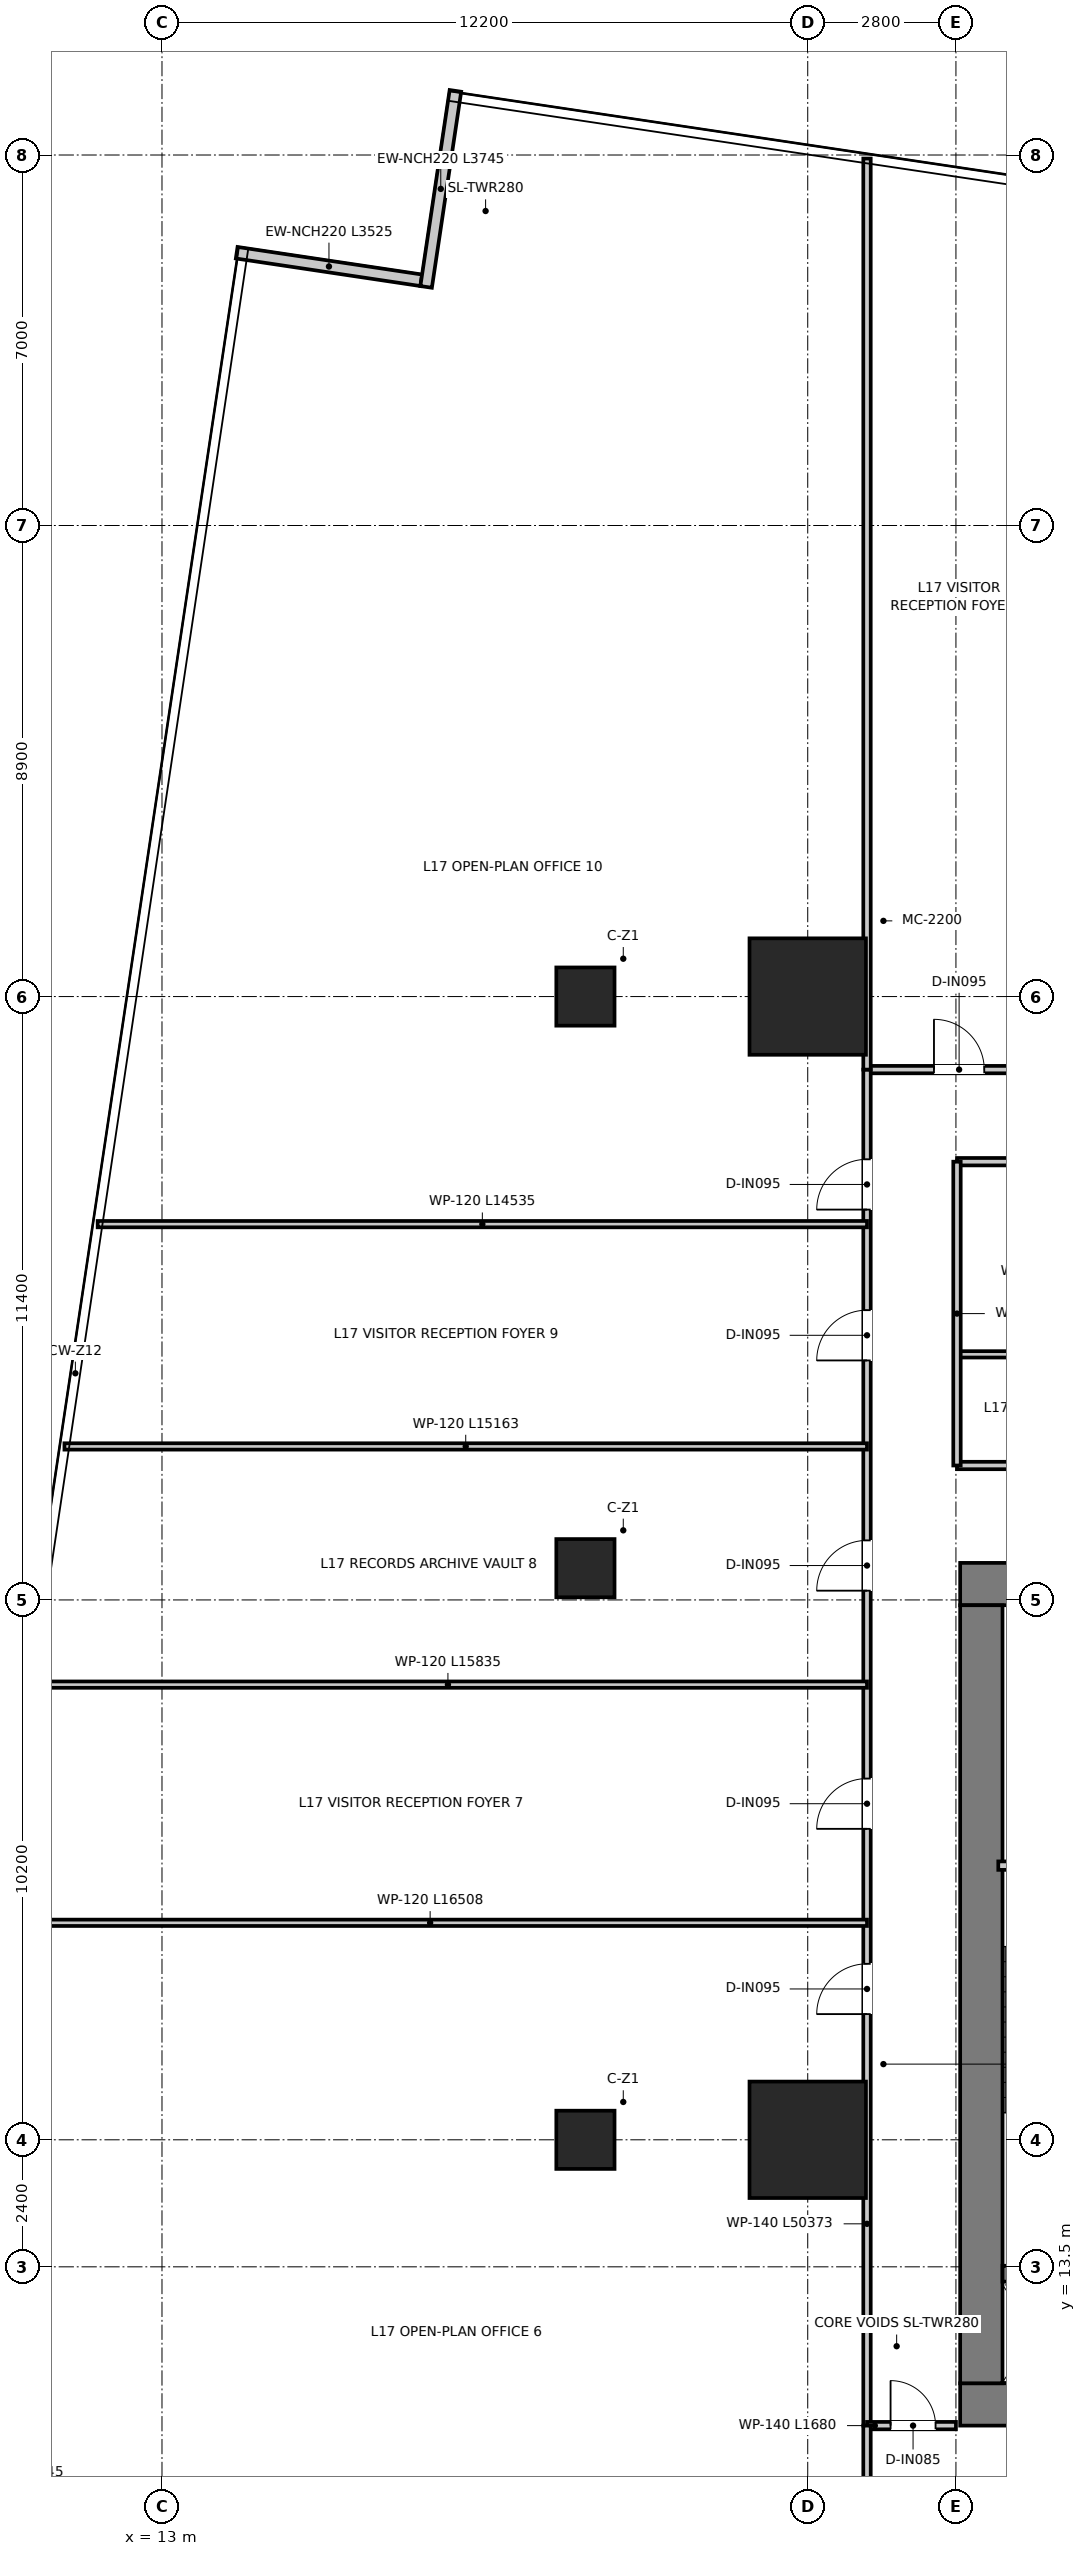
"""IFC4 building model, lengths in metres.
Left out: names, types, materials, properties, quantities, classifications, styles, units other than length and angle.
Written with IfcOpenShell. Run it as: python <this file> out.ifc"""

import sys

from ifc_helpers import new_model, si_unit, direction, frame, frame_2d, origin, origin_2d, place, context, subcontext, project, spatial, rectangle, extrude, source, transform, mapped, element, fill, save


model = new_model("IFC4")
c1 = context("Model", 3, precision=1e-05, world=origin(), true_north=direction((0.0, 1.0)))
c2 = subcontext(c1, "Body", "Model", "MODEL_VIEW")
j1 = project(units=[si_unit("LENGTHUNIT", "METRE"), si_unit("PLANEANGLEUNIT", "RADIAN")], contexts=[c1])
p1 = place(None, origin())
s1 = spatial("IfcSite", under=j1, at=p1, CompositionType="ELEMENT")
p2 = place(p1, origin())
s2 = spatial("IfcBuilding", under=s1, at=p2, CompositionType="ELEMENT")
p3 = place(p2, frame((0.0, 0.0, 72.4)))
s3 = spatial("IfcBuildingStorey", under=s2, at=p3, CompositionType="ELEMENT", Elevation=72.4)
p4 = place(p3, frame((28.08, 10.9, 0.0), z_axis=(0.0, 0.0, 1.0), x_axis=(1.0, 0.0, 0.0)))
e1 = element("IfcWall", 1, at=p4, inside=s3, PredefinedType="SHEAR", context=c2, shape_type="SweptSolid", body=[
    extrude(rectangle(XDim=15.84, YDim=0.8, at=frame_2d((7.92, 0.0))), origin(), (0.0, 0.0, 1.0), 3.95),
])
p5 = place(p3, frame((28.08, 26.4, 0.0), z_axis=(0.0, 0.0, 1.0), x_axis=(1.0, 0.0, 0.0)))
e2 = element("IfcWall", 2, at=p5, inside=s3, PredefinedType="SHEAR", context=c2, shape_type="SweptSolid", body=[
    extrude(rectangle(XDim=15.84, YDim=0.8, at=frame_2d((7.92, 0.0))), origin(), (0.0, 0.0, 1.0), 3.95),
])
p6 = place(p5, frame((7.22, 0.0, 0.0)))
e3 = element("IfcOpeningElement", 3, at=p6, cuts=e2, PredefinedType="OPENING", context=c2, shape_type="SweptSolid", body=[
    extrude(rectangle(XDim=1.4, YDim=2.2, at=frame_2d((0.7, 1.1))), frame((0.0, 0.41, 0.0), z_axis=(0.0, -1.0, 0.0), x_axis=(1.0, 0.0, 0.0)), (0.0, 0.0, 1.0), 0.82),
])
p7 = place(p5, frame((1.775, 0.0, 0.0)))
e4 = element("IfcOpeningElement", 4, at=p7, cuts=e2, PredefinedType="OPENING", context=c2, shape_type="SweptSolid", body=[
    extrude(rectangle(XDim=1.05, YDim=2.1, at=frame_2d((0.525, 1.05))), frame((0.0, 0.41, 0.0), z_axis=(0.0, -1.0, 0.0), x_axis=(1.0, 0.0, 0.0)), (0.0, 0.0, 1.0), 0.82),
])
p8 = place(p5, frame((13.015, 0.0, 0.0)))
e5 = element("IfcOpeningElement", 5, at=p8, cuts=e2, PredefinedType="OPENING", context=c2, shape_type="SweptSolid", body=[
    extrude(rectangle(XDim=1.05, YDim=2.1, at=frame_2d((0.525, 1.05))), frame((0.0, 0.41, 0.0), z_axis=(0.0, -1.0, 0.0), x_axis=(1.0, 0.0, 0.0)), (0.0, 0.0, 1.0), 0.82),
])
p9 = place(p3, frame((28.48, 11.3, 0.0), z_axis=(0.0, 0.0, 1.0), x_axis=(0.0, 1.0, 0.0)))
e6 = element("IfcWall", 6, at=p9, inside=s3, PredefinedType="SHEAR", context=c2, shape_type="SweptSolid", body=[
    extrude(rectangle(XDim=14.7, YDim=0.8, at=frame_2d((7.35, 0.0))), origin(), (0.0, 0.0, 1.0), 3.95),
])
p10 = place(p3, frame((28.88, 13.37, 0.0), z_axis=(0.0, 0.0, 1.0), x_axis=(1.0, 0.0, 0.0)))
e7 = element("IfcWall", 7, at=p10, inside=s3, PredefinedType="SHEAR", context=c2, shape_type="SweptSolid", body=[
    extrude(rectangle(XDim=3.1, YDim=0.3, at=frame_2d((1.55, 0.0))), origin(), (0.0, 0.0, 1.0), 3.95),
])
m1 = source(origin(), c2, "Body", "SweptSolid", [
    extrude(rectangle(XDim=2.2, YDim=2.2, at=origin_2d()), origin(), (0.0, 0.0, 1.0), 3.95),
])
for number, where, z_axis, x_axis in (
    (8, (25.2, 15.9, 0.0), (0.0, 0.0, 1.0), (1.0, 0.0, 0.0)),
    (9, (25.2, 37.5, 0.0), (0.0, 0.0, 1.0), (1.0, 0.0, 0.0)),
):
    element("IfcColumn", number, at=place(p3, frame(where, z_axis=z_axis, x_axis=x_axis)), inside=s3, PredefinedType="USERDEFINED", context=c2, shape_type="MappedRepresentation", body=[
        mapped(m1, transform((0.0, 0.0, 0.0), x_axis=(1.0, 0.0, 0.0), y_axis=(0.0, 1.0, 0.0), z_axis=(0.0, 0.0, 1.0), scale=1.0)),
    ])
m2 = source(origin(), c2, "Body", "SweptSolid", [
    extrude(rectangle(XDim=1.1, YDim=1.1, at=origin_2d()), origin(), (0.0, 0.0, 1.0), 3.95),
])
for number, where, z_axis, x_axis in (
    (10, (21.0, 15.9, 0.0), (0.0, 0.0, 1.0), (1.0, 0.0, 0.0)),
    (11, (21.0, 26.7, 0.0), (0.0, 0.0, 1.0), (1.0, 0.0, 0.0)),
    (12, (21.0, 37.5, 0.0), (0.0, 0.0, 1.0), (1.0, 0.0, 0.0)),
):
    element("IfcColumn", number, at=place(p3, frame(where, z_axis=z_axis, x_axis=x_axis)), inside=s3, PredefinedType="COLUMN", context=c2, shape_type="MappedRepresentation", body=[
        mapped(m2, transform((0.0, 0.0, 0.0), x_axis=(1.0, 0.0, 0.0), y_axis=(0.0, 1.0, 0.0), z_axis=(0.0, 0.0, 1.0), scale=1.0)),
    ])
p11 = place(p3, frame((17.898, 51.033, 0.0), z_axis=(0.0, 0.0, 1.0), x_axis=(-0.989015973204, 0.147808676155, 0.0)))
e13 = element("IfcWall", 13, at=p11, inside=s3, PredefinedType="ELEMENTEDWALL", context=c2, shape_type="SweptSolid", body=[
    extrude(rectangle(XDim=3.525, YDim=0.22, at=frame_2d((1.762, 0.0))), origin(), (0.0, 0.0, 1.0), 3.67),
])
p12 = place(p3, frame((18.544, 54.612, 0.0), z_axis=(0.0, 0.0, 1.0), x_axis=(-0.147852699435, -0.989009392913, 0.0)))
e14 = element("IfcWall", 14, at=p12, inside=s3, PredefinedType="ELEMENTEDWALL", context=c2, shape_type="SweptSolid", body=[
    extrude(rectangle(XDim=3.745, YDim=0.22, at=frame_2d((1.873, 0.0))), origin(), (0.0, 0.0, 1.0), 3.67),
])
p13 = place(p3, frame((28.8, 21.08, 0.0), z_axis=(0.0, 0.0, 1.0), x_axis=(1.0, 0.0, 0.0)))
e15 = element("IfcWall", 15, at=p13, inside=s3, PredefinedType="PARTITIONING", context=c2, shape_type="SweptSolid", body=[
    extrude(rectangle(XDim=3.16, YDim=0.16, at=frame_2d((1.58, 0.0))), origin(), (0.0, 0.0, 1.0), 3.67),
])
p14 = place(p13, frame((1.055, 0.0, 0.0)))
e16 = element("IfcOpeningElement", 16, at=p14, cuts=e15, PredefinedType="OPENING", context=c2, shape_type="SweptSolid", body=[
    extrude(rectangle(XDim=1.05, YDim=2.1, at=frame_2d((0.525, 1.05))), frame((0.0, 0.09, 0.0), z_axis=(0.0, -1.0, 0.0), x_axis=(1.0, 0.0, 0.0)), (0.0, 0.0, 1.0), 0.18),
])
p15 = place(p3, frame((28.02, 28.64, 0.0), z_axis=(0.0, 0.0, 1.0), x_axis=(1.0, 0.0, 0.0)))
e17 = element("IfcWall", 17, at=p15, inside=s3, PredefinedType="PARTITIONING", context=c2, shape_type="SweptSolid", body=[
    extrude(rectangle(XDim=15.96, YDim=0.14, at=frame_2d((7.98, 0.0))), origin(), (0.0, 0.0, 1.0), 3.08),
])
p16 = place(p15, frame((7.455, 0.0, 0.0)))
e18 = element("IfcOpeningElement", 18, at=p16, cuts=e17, PredefinedType="OPENING", context=c2, shape_type="SweptSolid", body=[
    extrude(rectangle(XDim=1.05, YDim=2.15, at=frame_2d((0.525, 1.075))), frame((0.0, 0.08, 0.0), z_axis=(0.0, -1.0, 0.0), x_axis=(1.0, 0.0, 0.0)), (0.0, 0.0, 1.0), 0.16),
])
p17 = place(p3, frame((28.02, 30.74, 0.0), z_axis=(0.0, 0.0, 1.0), x_axis=(1.0, 0.0, 0.0)))
e19 = element("IfcWall", 19, at=p17, inside=s3, PredefinedType="PARTITIONING", context=c2, shape_type="SweptSolid", body=[
    extrude(rectangle(XDim=15.96, YDim=0.12, at=frame_2d((7.98, 0.0))), origin(), (0.0, 0.0, 1.0), 3.08),
])
p18 = place(p3, frame((28.02, 34.38, 0.0), z_axis=(0.0, 0.0, 1.0), x_axis=(1.0, 0.0, 0.0)))
e20 = element("IfcWall", 20, at=p18, inside=s3, PredefinedType="PARTITIONING", context=c2, shape_type="SweptSolid", body=[
    extrude(rectangle(XDim=15.96, YDim=0.14, at=frame_2d((7.98, 0.0))), origin(), (0.0, 0.0, 1.0), 3.08),
])
p19 = place(p18, frame((1.13, 0.0, 0.0)))
e21 = element("IfcOpeningElement", 21, at=p19, cuts=e20, PredefinedType="OPENING", context=c2, shape_type="SweptSolid", body=[
    extrude(rectangle(XDim=0.9, YDim=2.1, at=frame_2d((0.45, 1.05))), frame((0.0, 0.08, 0.0), z_axis=(0.0, -1.0, 0.0), x_axis=(1.0, 0.0, 0.0)), (0.0, 0.0, 1.0), 0.16),
])
p20 = place(p18, frame((4.33, 0.0, 0.0)))
e22 = element("IfcOpeningElement", 22, at=p20, cuts=e20, PredefinedType="OPENING", context=c2, shape_type="SweptSolid", body=[
    extrude(rectangle(XDim=0.9, YDim=2.1, at=frame_2d((0.45, 1.05))), frame((0.0, 0.08, 0.0), z_axis=(0.0, -1.0, 0.0), x_axis=(1.0, 0.0, 0.0)), (0.0, 0.0, 1.0), 0.16),
])
p21 = place(p18, frame((7.355, 0.0, 0.0)))
e23 = element("IfcOpeningElement", 23, at=p21, cuts=e20, PredefinedType="OPENING", context=c2, shape_type="SweptSolid", body=[
    extrude(rectangle(XDim=0.95, YDim=2.1, at=frame_2d((0.475, 1.05))), frame((0.0, 0.08, 0.0), z_axis=(0.0, -1.0, 0.0), x_axis=(1.0, 0.0, 0.0)), (0.0, 0.0, 1.0), 0.16),
])
p22 = place(p18, frame((12.23, 0.0, 0.0)))
e24 = element("IfcOpeningElement", 24, at=p22, cuts=e20, PredefinedType="OPENING", context=c2, shape_type="SweptSolid", body=[
    extrude(rectangle(XDim=0.95, YDim=2.1, at=frame_2d((0.475, 1.05))), frame((0.0, 0.08, 0.0), z_axis=(0.0, -1.0, 0.0), x_axis=(1.0, 0.0, 0.0)), (0.0, 0.0, 1.0), 0.16),
])
p23 = place(p3, frame((28.02, 28.64, 0.0), z_axis=(0.0, 0.0, 1.0), x_axis=(0.0, 1.0, 0.0)))
e25 = element("IfcWall", 25, at=p23, inside=s3, PredefinedType="PARTITIONING", context=c2, shape_type="SweptSolid", body=[
    extrude(rectangle(XDim=5.74, YDim=0.14, at=frame_2d((2.87, 0.0))), origin(), (0.0, 0.0, 1.0), 3.22),
])
p24 = place(p3, frame((26.32, 36.12, 0.0), z_axis=(0.0, 0.0, 1.0), x_axis=(1.0, 0.0, 0.0)))
e26 = element("IfcWall", 26, at=p24, inside=s3, PredefinedType="PARTITIONING", context=c2, shape_type="SweptSolid", body=[
    extrude(rectangle(XDim=19.36, YDim=0.14, at=frame_2d((9.68, 0.0))), origin(), (0.0, 0.0, 1.0), 3.08),
])
p25 = place(p24, frame((1.265, 0.0, 0.0)))
e27 = element("IfcOpeningElement", 27, at=p25, cuts=e26, PredefinedType="OPENING", context=c2, shape_type="SweptSolid", body=[
    extrude(rectangle(XDim=0.95, YDim=2.1, at=frame_2d((0.475, 1.05))), frame((0.0, 0.08, 0.0), z_axis=(0.0, -1.0, 0.0), x_axis=(1.0, 0.0, 0.0)), (0.0, 0.0, 1.0), 0.16),
])
p26 = place(p24, frame((5.305, 0.0, 0.0)))
e28 = element("IfcOpeningElement", 28, at=p26, cuts=e26, PredefinedType="OPENING", context=c2, shape_type="SweptSolid", body=[
    extrude(rectangle(XDim=0.95, YDim=2.1, at=frame_2d((0.475, 1.05))), frame((0.0, 0.08, 0.0), z_axis=(0.0, -1.0, 0.0), x_axis=(1.0, 0.0, 0.0)), (0.0, 0.0, 1.0), 0.16),
])
p27 = place(p24, frame((9.905, 0.0, 0.0)))
e29 = element("IfcOpeningElement", 29, at=p27, cuts=e26, PredefinedType="OPENING", context=c2, shape_type="SweptSolid", body=[
    extrude(rectangle(XDim=0.95, YDim=2.1, at=frame_2d((0.475, 1.05))), frame((0.0, 0.08, 0.0), z_axis=(0.0, -1.0, 0.0), x_axis=(1.0, 0.0, 0.0)), (0.0, 0.0, 1.0), 0.16),
])
p28 = place(p24, frame((14.305, 0.0, 0.0)))
e30 = element("IfcOpeningElement", 30, at=p28, cuts=e26, PredefinedType="OPENING", context=c2, shape_type="SweptSolid", body=[
    extrude(rectangle(XDim=0.95, YDim=2.1, at=frame_2d((0.475, 1.05))), frame((0.0, 0.08, 0.0), z_axis=(0.0, -1.0, 0.0), x_axis=(1.0, 0.0, 0.0)), (0.0, 0.0, 1.0), 0.16),
])
p29 = place(p24, frame((17.645, 0.0, 0.0)))
e31 = element("IfcOpeningElement", 31, at=p29, cuts=e26, PredefinedType="OPENING", context=c2, shape_type="SweptSolid", body=[
    extrude(rectangle(XDim=0.95, YDim=2.1, at=frame_2d((0.475, 1.05))), frame((0.0, 0.08, 0.0), z_axis=(0.0, -1.0, 0.0), x_axis=(1.0, 0.0, 0.0)), (0.0, 0.0, 1.0), 0.16),
])
p30 = place(p3, frame((26.32, 10.5, 0.0), z_axis=(0.0, 0.0, 1.0), x_axis=(0.0, 1.0, 0.0)))
e32 = element("IfcWall", 32, at=p30, inside=s3, PredefinedType="PARTITIONING", context=c2, shape_type="SweptSolid", body=[
    extrude(rectangle(XDim=25.62, YDim=0.14, at=frame_2d((12.81, 0.0))), origin(), (0.0, 0.0, 1.0), 2.97),
])
p31 = place(p30, frame((7.775, 0.0, 0.0)))
e33 = element("IfcOpeningElement", 33, at=p31, cuts=e32, PredefinedType="OPENING", context=c2, shape_type="SweptSolid", body=[
    extrude(rectangle(XDim=0.95, YDim=2.1, at=frame_2d((0.475, 1.05))), frame((0.0, 0.08, 0.0), z_axis=(0.0, -1.0, 0.0), x_axis=(1.0, 0.0, 0.0)), (0.0, 0.0, 1.0), 0.16),
])
p32 = place(p30, frame((11.275, 0.0, 0.0)))
e34 = element("IfcOpeningElement", 34, at=p32, cuts=e32, PredefinedType="OPENING", context=c2, shape_type="SweptSolid", body=[
    extrude(rectangle(XDim=0.95, YDim=2.1, at=frame_2d((0.475, 1.05))), frame((0.0, 0.08, 0.0), z_axis=(0.0, -1.0, 0.0), x_axis=(1.0, 0.0, 0.0)), (0.0, 0.0, 1.0), 0.16),
])
p33 = place(p30, frame((15.775, 0.0, 0.0)))
e35 = element("IfcOpeningElement", 35, at=p33, cuts=e32, PredefinedType="OPENING", context=c2, shape_type="SweptSolid", body=[
    extrude(rectangle(XDim=0.95, YDim=2.1, at=frame_2d((0.475, 1.05))), frame((0.0, 0.08, 0.0), z_axis=(0.0, -1.0, 0.0), x_axis=(1.0, 0.0, 0.0)), (0.0, 0.0, 1.0), 0.16),
])
p34 = place(p30, frame((20.125, 0.0, 0.0)))
e36 = element("IfcOpeningElement", 36, at=p34, cuts=e32, PredefinedType="OPENING", context=c2, shape_type="SweptSolid", body=[
    extrude(rectangle(XDim=0.95, YDim=2.1, at=frame_2d((0.475, 1.05))), frame((0.0, 0.08, 0.0), z_axis=(0.0, -1.0, 0.0), x_axis=(1.0, 0.0, 0.0)), (0.0, 0.0, 1.0), 0.16),
])
p35 = place(p30, frame((22.975, 0.0, 0.0)))
e37 = element("IfcOpeningElement", 37, at=p35, cuts=e32, PredefinedType="OPENING", context=c2, shape_type="SweptSolid", body=[
    extrude(rectangle(XDim=0.95, YDim=2.1, at=frame_2d((0.475, 1.05))), frame((0.0, 0.08, 0.0), z_axis=(0.0, -1.0, 0.0), x_axis=(1.0, 0.0, 0.0)), (0.0, 0.0, 1.0), 0.16),
])
p36 = place(p3, frame((26.32, 10.5, 0.0), z_axis=(0.0, 0.0, 1.0), x_axis=(1.0, 0.0, 0.0)))
e38 = element("IfcWall", 38, at=p36, inside=s3, PredefinedType="PARTITIONING", context=c2, shape_type="SweptSolid", body=[
    extrude(rectangle(XDim=1.68, YDim=0.14, at=frame_2d((0.84, 0.0))), origin(), (0.0, 0.0, 1.0), 3.67),
])
p37 = place(p36, frame((0.445, 0.0, 0.0)))
e39 = element("IfcOpeningElement", 39, at=p37, cuts=e38, PredefinedType="OPENING", context=c2, shape_type="SweptSolid", body=[
    extrude(rectangle(XDim=0.85, YDim=2.1, at=frame_2d((0.425, 1.05))), frame((0.0, 0.08, 0.0), z_axis=(0.0, -1.0, 0.0), x_axis=(1.0, 0.0, 0.0)), (0.0, 0.0, 1.0), 0.16),
])
p38 = place(p3, frame((26.32, 36.12, 0.0), z_axis=(0.0, 0.0, 1.0), x_axis=(0.0, 1.0, 0.0)))
e40 = element("IfcWall", 40, at=p38, inside=s3, PredefinedType="PARTITIONING", context=c2, shape_type="SweptSolid", body=[
    extrude(rectangle(XDim=17.213, YDim=0.14, at=frame_2d((8.606, 0.0))), origin(), (0.0, 0.0, 1.0), 2.97),
])
p39 = place(p3, frame((26.32, 2.96, 0.0), z_axis=(0.0, 0.0, 1.0), x_axis=(0.0, 1.0, 0.0)))
e41 = element("IfcWall", 41, at=p39, inside=s3, PredefinedType="PARTITIONING", context=c2, shape_type="SweptSolid", body=[
    extrude(rectangle(XDim=7.54, YDim=0.14, at=frame_2d((3.77, 0.0))), origin(), (0.0, 0.0, 1.0), 3.67),
])
p40 = place(p3, frame((9.812, 20.0, 0.0), z_axis=(0.0, 0.0, 1.0), x_axis=(1.0, 0.0, 0.0)))
e42 = element("IfcWall", 42, at=p40, inside=s3, PredefinedType="PARTITIONING", context=c2, shape_type="SweptSolid", body=[
    extrude(rectangle(XDim=16.508, YDim=0.12, at=frame_2d((8.254, 0.0))), origin(), (0.0, 0.0, 1.0), 2.97),
])
p41 = place(p3, frame((10.485, 24.5, 0.0), z_axis=(0.0, 0.0, 1.0), x_axis=(1.0, 0.0, 0.0)))
e43 = element("IfcWall", 43, at=p41, inside=s3, PredefinedType="PARTITIONING", context=c2, shape_type="SweptSolid", body=[
    extrude(rectangle(XDim=15.835, YDim=0.12, at=frame_2d((7.918, 0.0))), origin(), (0.0, 0.0, 1.0), 2.97),
])
p42 = place(p3, frame((11.157, 29.0, 0.0), z_axis=(0.0, 0.0, 1.0), x_axis=(1.0, 0.0, 0.0)))
e44 = element("IfcWall", 44, at=p42, inside=s3, PredefinedType="PARTITIONING", context=c2, shape_type="SweptSolid", body=[
    extrude(rectangle(XDim=15.163, YDim=0.12, at=frame_2d((7.582, 0.0))), origin(), (0.0, 0.0, 1.0), 2.97),
])
p43 = place(p3, frame((11.785, 33.2, 0.0), z_axis=(0.0, 0.0, 1.0), x_axis=(1.0, 0.0, 0.0)))
e45 = element("IfcWall", 45, at=p43, inside=s3, PredefinedType="PARTITIONING", context=c2, shape_type="SweptSolid", body=[
    extrude(rectangle(XDim=14.535, YDim=0.12, at=frame_2d((7.268, 0.0))), origin(), (0.0, 0.0, 1.0), 2.97),
])
p44 = place(p25, origin())
e46 = element("IfcDoor", 46, at=p44, inside=s3, OperationType="SINGLE_SWING_LEFT", PredefinedType="DOOR", context=c2, shape_type="SweptSolid", body=[
    extrude(rectangle(XDim=0.95, YDim=2.1, at=frame_2d((0.475, 1.05))), frame((0.0, 0.025, 0.0), z_axis=(0.0, -1.0, 0.0), x_axis=(1.0, 0.0, 0.0)), (0.0, 0.0, 1.0), 0.05),
])
fill(e27, e46)
p45 = place(p31, origin())
e47 = element("IfcDoor", 47, at=p45, inside=s3, OperationType="SINGLE_SWING_LEFT", PredefinedType="DOOR", context=c2, shape_type="SweptSolid", body=[
    extrude(rectangle(XDim=0.95, YDim=2.1, at=frame_2d((0.475, 1.05))), frame((0.0, 0.025, 0.0), z_axis=(0.0, -1.0, 0.0), x_axis=(1.0, 0.0, 0.0)), (0.0, 0.0, 1.0), 0.05),
])
fill(e33, e47)
p46 = place(p32, origin())
e48 = element("IfcDoor", 48, at=p46, inside=s3, OperationType="SINGLE_SWING_LEFT", PredefinedType="DOOR", context=c2, shape_type="SweptSolid", body=[
    extrude(rectangle(XDim=0.95, YDim=2.1, at=frame_2d((0.475, 1.05))), frame((0.0, 0.025, 0.0), z_axis=(0.0, -1.0, 0.0), x_axis=(1.0, 0.0, 0.0)), (0.0, 0.0, 1.0), 0.05),
])
fill(e34, e48)
p47 = place(p33, origin())
e49 = element("IfcDoor", 49, at=p47, inside=s3, OperationType="SINGLE_SWING_LEFT", PredefinedType="DOOR", context=c2, shape_type="SweptSolid", body=[
    extrude(rectangle(XDim=0.95, YDim=2.1, at=frame_2d((0.475, 1.05))), frame((0.0, 0.025, 0.0), z_axis=(0.0, -1.0, 0.0), x_axis=(1.0, 0.0, 0.0)), (0.0, 0.0, 1.0), 0.05),
])
fill(e35, e49)
p48 = place(p34, origin())
e50 = element("IfcDoor", 50, at=p48, inside=s3, OperationType="SINGLE_SWING_LEFT", PredefinedType="DOOR", context=c2, shape_type="SweptSolid", body=[
    extrude(rectangle(XDim=0.95, YDim=2.1, at=frame_2d((0.475, 1.05))), frame((0.0, 0.025, 0.0), z_axis=(0.0, -1.0, 0.0), x_axis=(1.0, 0.0, 0.0)), (0.0, 0.0, 1.0), 0.05),
])
fill(e36, e50)
p49 = place(p35, origin())
e51 = element("IfcDoor", 51, at=p49, inside=s3, OperationType="SINGLE_SWING_LEFT", PredefinedType="DOOR", context=c2, shape_type="SweptSolid", body=[
    extrude(rectangle(XDim=0.95, YDim=2.1, at=frame_2d((0.475, 1.05))), frame((0.0, 0.025, 0.0), z_axis=(0.0, -1.0, 0.0), x_axis=(1.0, 0.0, 0.0)), (0.0, 0.0, 1.0), 0.05),
])
fill(e37, e51)
p50 = place(p37, origin())
e52 = element("IfcDoor", 52, at=p50, inside=s3, OperationType="SINGLE_SWING_LEFT", PredefinedType="DOOR", context=c2, shape_type="SweptSolid", body=[
    extrude(rectangle(XDim=0.85, YDim=2.1, at=frame_2d((0.425, 1.05))), frame((0.0, 0.025, 0.0), z_axis=(0.0, -1.0, 0.0), x_axis=(1.0, 0.0, 0.0)), (0.0, 0.0, 1.0), 0.05),
])
fill(e39, e52)
save(model, sys.argv[1])
